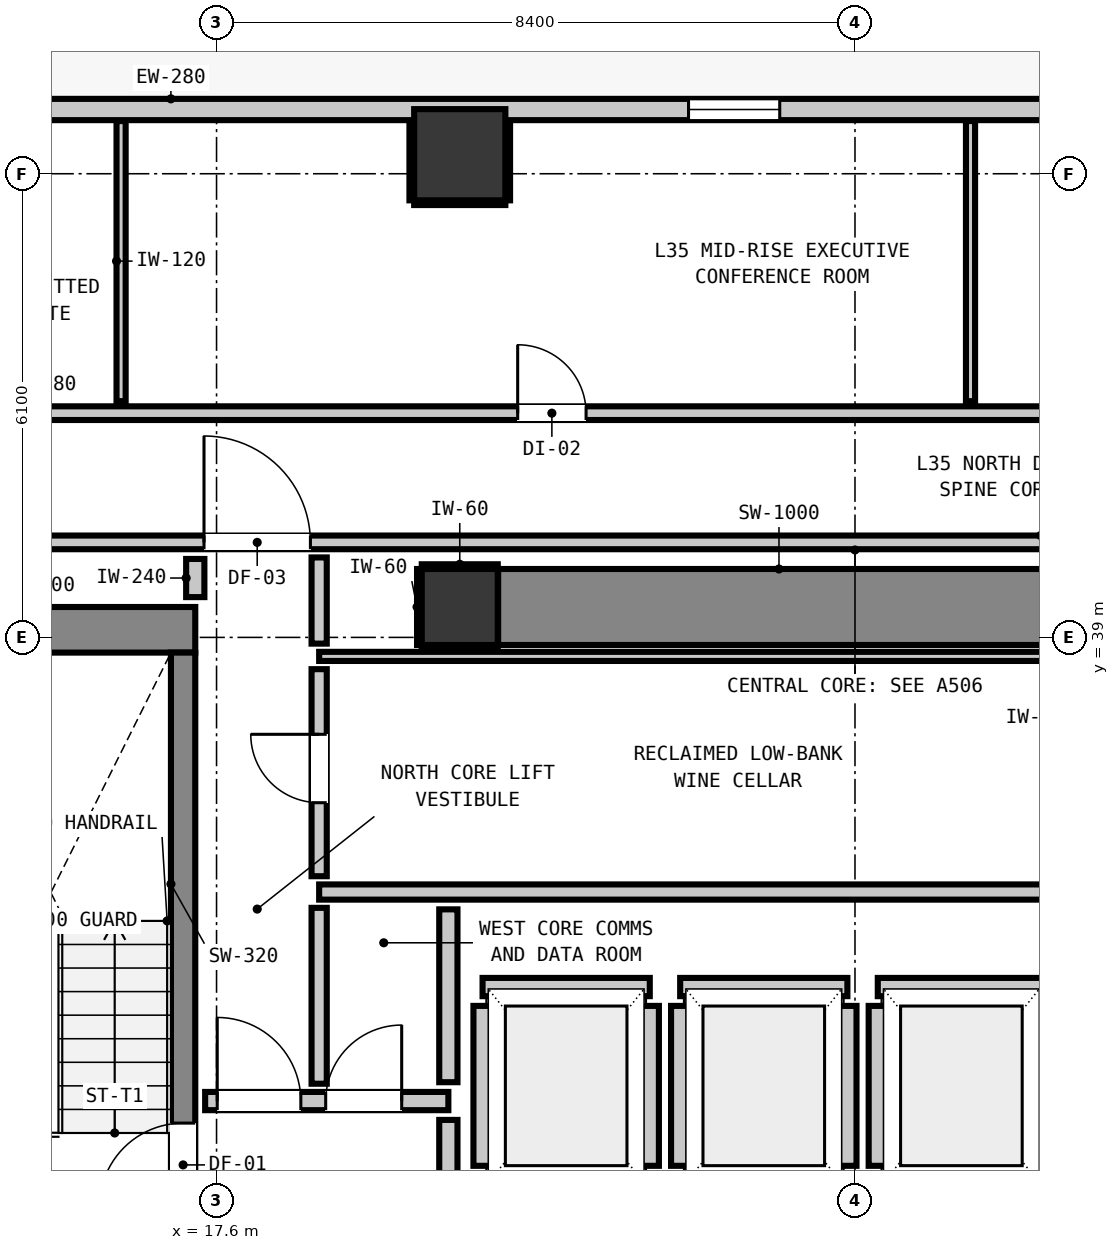
"""IFC4 building model, lengths in metres.
Left out: names, types, materials, properties, quantities, classifications, styles, units other than length and angle.
Written with IfcOpenShell. Run it as: python <this file> out.ifc"""

import sys

from ifc_helpers import new_model, si_unit, direction, frame, frame_2d, origin, origin_2d, place, context, subcontext, project, spatial, rectangle, extrude, element, fill, save


model = new_model("IFC4")
c1 = context("Model", 3, precision=1e-05, world=origin(), true_north=direction((0.0, 1.0)))
c2 = subcontext(c1, "Body", "Model", "MODEL_VIEW")
j1 = project(units=[si_unit("LENGTHUNIT", "METRE"), si_unit("PLANEANGLEUNIT", "RADIAN")], contexts=[c1])
p1 = place(None, origin())
s1 = spatial("IfcSite", under=j1, at=p1, CompositionType="ELEMENT")
p2 = place(p1, origin())
s2 = spatial("IfcBuilding", under=s1, at=p2, CompositionType="ELEMENT")
p3 = place(p2, frame((0.0, 0.0, 122.68)))
s3 = spatial("IfcBuildingStorey", under=s2, at=p3, CompositionType="ELEMENT", Elevation=122.68)
p4 = place(p3, frame((20.8, 39.4, 0.0), z_axis=(0.0, 0.0, 1.0), x_axis=(1.0, 0.0, 0.0)))
e1 = element("IfcColumn", 1, at=p4, inside=s3, PredefinedType="COLUMN", context=c2, shape_type="SweptSolid", body=[
    extrude(rectangle(XDim=1.0, YDim=1.0, at=origin_2d()), origin(), (0.0, 0.0, 1.0), 3.32),
])
p5 = place(p3, frame((13.24, 39.1, 0.0), z_axis=(0.0, 0.0, 1.0), x_axis=(1.0, 0.0, 0.0)))
e2 = element("IfcWall", 2, at=p5, inside=s3, PredefinedType="SHEAR", context=c2, shape_type="SweptSolid", body=[
    extrude(rectangle(XDim=4.08, YDim=0.6, at=frame_2d((2.04, 0.0))), origin(), (0.0, 0.0, 1.0), 3.32),
])
p6 = place(p3, frame((21.305, 39.4, 0.0), z_axis=(0.0, 0.0, 1.0), x_axis=(1.0, 0.0, 0.0)))
e3 = element("IfcWall", 3, at=p6, inside=s3, PredefinedType="SHEAR", context=c2, shape_type="SweptSolid", body=[
    extrude(rectangle(XDim=7.39, YDim=1.0, at=frame_2d((3.695, 0.0))), origin(), (0.0, 0.0, 1.0), 3.32),
])
p7 = place(p3, frame((17.16, 31.0, 0.0), z_axis=(0.0, 0.0, 1.0), x_axis=(0.0, 1.0, 0.0)))
e4 = element("IfcWall", 4, at=p7, inside=s3, PredefinedType="SHEAR", context=c2, shape_type="SweptSolid", body=[
    extrude(rectangle(XDim=7.8, YDim=0.32, at=frame_2d((3.9, 0.0))), origin(), (0.0, 0.0, 1.0), 3.32),
])
p8 = place(p7, frame((0.51, 0.0, 0.0)))
e5 = element("IfcOpeningElement", 5, at=p8, cuts=e4, PredefinedType="OPENING", context=c2, shape_type="SweptSolid", body=[
    extrude(rectangle(XDim=1.1, YDim=2.15, at=frame_2d((0.55, 1.075))), frame((0.0, 0.17, 0.0), z_axis=(0.0, -1.0, 0.0), x_axis=(1.0, 0.0, 0.0)), (0.0, 0.0, 1.0), 0.34),
])
p9 = place(p3, frame((20.8, 45.35, 0.0), z_axis=(0.0, 0.0, 1.0), x_axis=(1.0, 0.0, 0.0)))
e6 = element("IfcColumn", 6, at=p9, inside=s3, PredefinedType="COLUMN", context=c2, shape_type="SweptSolid", body=[
    extrude(rectangle(XDim=1.2, YDim=1.2, at=origin_2d()), origin(), (0.0, 0.0, 1.0), 2.9),
])
p10 = place(p3, frame((5.355, 45.945, 0.0), z_axis=(0.0, 0.0, 1.0), x_axis=(1.0, 0.0, 0.0)))
e7 = element("IfcWall", 7, at=p10, inside=s3, PredefinedType="STANDARD", context=c2, shape_type="SweptSolid", body=[
    extrude(rectangle(XDim=35.09, YDim=0.28, at=frame_2d((17.545, 0.0))), origin(), (0.0, 0.0, 1.0), 2.9),
])
p11 = place(p10, frame((0.904, 0.0, 0.0)))
e8 = element("IfcOpeningElement", 8, at=p11, cuts=e7, PredefinedType="OPENING", context=c2, shape_type="SweptSolid", body=[
    extrude(rectangle(XDim=1.0, YDim=2.15, at=frame_2d((0.5, 1.075))), frame((0.0, 0.15, 0.0), z_axis=(0.0, -1.0, 0.0), x_axis=(1.0, 0.0, 0.0)), (0.0, 0.0, 1.0), 0.3),
])
p12 = place(p10, frame((3.634, 0.0, 0.85)))
e9 = element("IfcOpeningElement", 9, at=p12, cuts=e7, PredefinedType="OPENING", context=c2, shape_type="SweptSolid", body=[
    extrude(rectangle(XDim=1.2, YDim=1.8, at=frame_2d((0.6, 0.9))), frame((0.0, 0.15, 0.0), z_axis=(0.0, -1.0, 0.0), x_axis=(1.0, 0.0, 0.0)), (0.0, 0.0, 1.0), 0.3),
])
p13 = place(p10, frame((18.455, 0.0, 0.85)))
e10 = element("IfcOpeningElement", 10, at=p13, cuts=e7, PredefinedType="OPENING", context=c2, shape_type="SweptSolid", body=[
    extrude(rectangle(XDim=1.2, YDim=1.8, at=frame_2d((0.6, 0.9))), frame((0.0, 0.15, 0.0), z_axis=(0.0, -1.0, 0.0), x_axis=(1.0, 0.0, 0.0)), (0.0, 0.0, 1.0), 0.3),
])
p14 = place(p10, frame((26.895, 0.0, 0.85)))
e11 = element("IfcOpeningElement", 11, at=p14, cuts=e7, PredefinedType="OPENING", context=c2, shape_type="SweptSolid", body=[
    extrude(rectangle(XDim=1.2, YDim=1.8, at=frame_2d((0.6, 0.9))), frame((0.0, 0.15, 0.0), z_axis=(0.0, -1.0, 0.0), x_axis=(1.0, 0.0, 0.0)), (0.0, 0.0, 1.0), 0.3),
])
p15 = place(p3, frame((21.1, 34.4, 0.0), z_axis=(0.0, 0.0, 1.0), x_axis=(1.0, 0.0, 0.0)))
e12 = element("IfcWall", 12, at=p15, inside=s3, PredefinedType="PARTITIONING", context=c2, shape_type="SweptSolid", body=[
    extrude(rectangle(XDim=2.2, YDim=0.24, at=frame_2d((1.1, 0.0))), origin(), (0.0, 0.0, 1.0), 2.9),
])
p16 = place(p3, frame((21.1, 32.048, 0.0), z_axis=(0.0, 0.0, 1.0), x_axis=(0.0, 1.0, 0.0)))
e13 = element("IfcWall", 13, at=p16, inside=s3, PredefinedType="PARTITIONING", context=c2, shape_type="SweptSolid", body=[
    extrude(rectangle(XDim=2.104, YDim=0.24, at=frame_2d((1.052, 0.0))), origin(), (0.0, 0.0, 1.0), 0.905),
])
p17 = place(p3, frame((23.3, 32.048, 0.0), z_axis=(0.0, 0.0, 1.0), x_axis=(0.0, 1.0, 0.0)))
e14 = element("IfcWall", 14, at=p17, inside=s3, PredefinedType="PARTITIONING", context=c2, shape_type="SweptSolid", body=[
    extrude(rectangle(XDim=2.104, YDim=0.24, at=frame_2d((1.052, 0.0))), origin(), (0.0, 0.0, 1.0), 2.9),
])
p18 = place(p3, frame((23.7, 34.4, 0.0), z_axis=(0.0, 0.0, 1.0), x_axis=(1.0, 0.0, 0.0)))
e15 = element("IfcWall", 15, at=p18, inside=s3, PredefinedType="PARTITIONING", context=c2, shape_type="SweptSolid", body=[
    extrude(rectangle(XDim=2.2, YDim=0.24, at=frame_2d((1.1, 0.0))), origin(), (0.0, 0.0, 1.0), 2.9),
])
for number, where, z_axis, x_axis in (
    (16, (23.7, 32.048, 0.0), (0.0, 0.0, 1.0), (0.0, 1.0, 0.0)),
    (17, (25.9, 32.048, 0.0), (0.0, 0.0, 1.0), (0.0, 1.0, 0.0)),
):
    element("IfcWall", number, at=place(p3, frame(where, z_axis=z_axis, x_axis=x_axis)), inside=s3, PredefinedType="PARTITIONING", context=c2, shape_type="SweptSolid", body=[
        extrude(rectangle(XDim=2.104, YDim=0.24, at=frame_2d((1.052, 0.0))), origin(), (0.0, 0.0, 1.0), 2.9),
    ])
p19 = place(p3, frame((26.3, 34.4, 0.0), z_axis=(0.0, 0.0, 1.0), x_axis=(1.0, 0.0, 0.0)))
e18 = element("IfcWall", 18, at=p19, inside=s3, PredefinedType="PARTITIONING", context=c2, shape_type="SweptSolid", body=[
    extrude(rectangle(XDim=2.2, YDim=0.24, at=frame_2d((1.1, 0.0))), origin(), (0.0, 0.0, 1.0), 2.9),
])
p20 = place(p3, frame((26.3, 32.048, 0.0), z_axis=(0.0, 0.0, 1.0), x_axis=(0.0, 1.0, 0.0)))
e19 = element("IfcWall", 19, at=p20, inside=s3, PredefinedType="PARTITIONING", context=c2, shape_type="SweptSolid", body=[
    extrude(rectangle(XDim=2.104, YDim=0.24, at=frame_2d((1.052, 0.0))), origin(), (0.0, 0.0, 1.0), 2.9),
])
p21 = place(p3, frame((28.5, 32.048, 0.0), z_axis=(0.0, 0.0, 1.0), x_axis=(0.0, 1.0, 0.0)))
e20 = element("IfcWall", 20, at=p21, inside=s3, PredefinedType="PARTITIONING", context=c2, shape_type="SweptSolid", body=[
    extrude(rectangle(XDim=2.104, YDim=0.24, at=frame_2d((1.052, 0.0))), origin(), (0.0, 0.0, 1.0), 0.905),
])
p22 = place(p3, frame((17.45, 32.9, 0.0), z_axis=(0.0, 0.0, 1.0), x_axis=(1.0, 0.0, 0.0)))
e21 = element("IfcWall", 21, at=p22, inside=s3, PredefinedType="PARTITIONING", context=c2, shape_type="SweptSolid", body=[
    extrude(rectangle(XDim=3.2, YDim=0.24, at=frame_2d((1.6, 0.0))), origin(), (0.0, 0.0, 1.0), 2.9),
])
p23 = place(p22, frame((0.159, 0.0, 0.0)))
e22 = element("IfcOpeningElement", 22, at=p23, cuts=e21, PredefinedType="OPENING", context=c2, shape_type="SweptSolid", body=[
    extrude(rectangle(XDim=1.1, YDim=2.15, at=frame_2d((0.55, 1.075))), frame((0.0, 0.13, 0.0), z_axis=(0.0, -1.0, 0.0), x_axis=(1.0, 0.0, 0.0)), (0.0, 0.0, 1.0), 0.26),
])
p24 = place(p22, frame((1.586, 0.0, 0.0)))
e23 = element("IfcOpeningElement", 23, at=p24, cuts=e21, PredefinedType="OPENING", context=c2, shape_type="SweptSolid", body=[
    extrude(rectangle(XDim=1.0, YDim=2.15, at=frame_2d((0.5, 1.075))), frame((0.0, 0.13, 0.0), z_axis=(0.0, -1.0, 0.0), x_axis=(1.0, 0.0, 0.0)), (0.0, 0.0, 1.0), 0.26),
])
p25 = place(p3, frame((18.95, 35.65, 0.0), z_axis=(0.0, 0.0, 1.0), x_axis=(1.0, 0.0, 0.0)))
e24 = element("IfcWall", 24, at=p25, inside=s3, PredefinedType="PARTITIONING", context=c2, shape_type="SweptSolid", body=[
    extrude(rectangle(XDim=11.025, YDim=0.2, at=frame_2d((5.513, 0.0))), origin(), (0.0, 0.0, 1.0), 2.9),
])
p26 = place(p3, frame((3.207, 40.25, 0.0), z_axis=(0.0, 0.0, 1.0), x_axis=(1.0, 0.0, 0.0)))
e25 = element("IfcWall", 25, at=p26, inside=s3, PredefinedType="PARTITIONING", context=c2, shape_type="SweptSolid", body=[
    extrude(rectangle(XDim=39.386, YDim=0.18, at=frame_2d((19.693, 0.0))), origin(), (0.0, 0.0, 1.0), 2.9),
])
p27 = place(p26, frame((14.228, 0.0, 0.0)))
e26 = element("IfcOpeningElement", 26, at=p27, cuts=e25, PredefinedType="OPENING", context=c2, shape_type="SweptSolid", body=[
    extrude(rectangle(XDim=1.4, YDim=2.15, at=frame_2d((0.7, 1.075))), frame((0.0, 0.1, 0.0), z_axis=(0.0, -1.0, 0.0), x_axis=(1.0, 0.0, 0.0)), (0.0, 0.0, 1.0), 0.2),
])
p28 = place(p26, frame((7.243, 0.0, 0.0)))
e27 = element("IfcOpeningElement", 27, at=p28, cuts=e25, PredefinedType="OPENING", context=c2, shape_type="SweptSolid", body=[
    extrude(rectangle(XDim=1.4, YDim=2.15, at=frame_2d((0.7, 1.075))), frame((0.0, 0.1, 0.0), z_axis=(0.0, -1.0, 0.0), x_axis=(1.0, 0.0, 0.0)), (0.0, 0.0, 1.0), 0.2),
])
p29 = place(p26, frame((34.843, 0.0, 0.0)))
e28 = element("IfcOpeningElement", 28, at=p29, cuts=e25, PredefinedType="OPENING", context=c2, shape_type="SweptSolid", body=[
    extrude(rectangle(XDim=1.4, YDim=2.15, at=frame_2d((0.7, 1.075))), frame((0.0, 0.1, 0.0), z_axis=(0.0, -1.0, 0.0), x_axis=(1.0, 0.0, 0.0)), (0.0, 0.0, 1.0), 0.2),
])
p30 = place(p26, frame((3.017, 0.0, 0.0)))
e29 = element("IfcOpeningElement", 29, at=p30, cuts=e25, PredefinedType="OPENING", context=c2, shape_type="SweptSolid", body=[
    extrude(rectangle(XDim=0.95, YDim=2.1, at=frame_2d((0.475, 1.05))), frame((0.0, 0.1, 0.0), z_axis=(0.0, -1.0, 0.0), x_axis=(1.0, 0.0, 0.0)), (0.0, 0.0, 1.0), 0.2),
])
p31 = place(p26, frame((37.414, 0.0, 0.0)))
e30 = element("IfcOpeningElement", 30, at=p31, cuts=e25, PredefinedType="OPENING", context=c2, shape_type="SweptSolid", body=[
    extrude(rectangle(XDim=0.9, YDim=2.1, at=frame_2d((0.45, 1.05))), frame((0.0, 0.1, 0.0), z_axis=(0.0, -1.0, 0.0), x_axis=(1.0, 0.0, 0.0)), (0.0, 0.0, 1.0), 0.2),
])
p32 = place(p3, frame((3.207, 41.95, 0.0), z_axis=(0.0, 0.0, 1.0), x_axis=(1.0, 0.0, 0.0)))
e31 = element("IfcWall", 31, at=p32, inside=s3, PredefinedType="PARTITIONING", context=c2, shape_type="SweptSolid", body=[
    extrude(rectangle(XDim=39.386, YDim=0.18, at=frame_2d((19.693, 0.0))), origin(), (0.0, 0.0, 1.0), 2.9),
])
p33 = place(p32, frame((4.828, 0.0, 0.0)))
e32 = element("IfcOpeningElement", 32, at=p33, cuts=e31, PredefinedType="OPENING", context=c2, shape_type="SweptSolid", body=[
    extrude(rectangle(XDim=1.0, YDim=2.15, at=frame_2d((0.5, 1.075))), frame((0.0, 0.1, 0.0), z_axis=(0.0, -1.0, 0.0), x_axis=(1.0, 0.0, 0.0)), (0.0, 0.0, 1.0), 0.2),
])
p34 = place(p32, frame((18.355, 0.0, 0.0)))
e33 = element("IfcOpeningElement", 33, at=p34, cuts=e31, PredefinedType="OPENING", context=c2, shape_type="SweptSolid", body=[
    extrude(rectangle(XDim=0.9, YDim=2.1, at=frame_2d((0.45, 1.05))), frame((0.0, 0.1, 0.0), z_axis=(0.0, -1.0, 0.0), x_axis=(1.0, 0.0, 0.0)), (0.0, 0.0, 1.0), 0.2),
])
p35 = place(p32, frame((31.379, 0.0, 0.0)))
e34 = element("IfcOpeningElement", 34, at=p35, cuts=e31, PredefinedType="OPENING", context=c2, shape_type="SweptSolid", body=[
    extrude(rectangle(XDim=0.9, YDim=2.1, at=frame_2d((0.45, 1.05))), frame((0.0, 0.1, 0.0), z_axis=(0.0, -1.0, 0.0), x_axis=(1.0, 0.0, 0.0)), (0.0, 0.0, 1.0), 0.2),
])
p36 = place(p3, frame((18.95, 38.75, 0.0), z_axis=(0.0, 0.0, 1.0), x_axis=(1.0, 0.0, 0.0)))
e35 = element("IfcWall", 35, at=p36, inside=s3, PredefinedType="PARTITIONING", context=c2, shape_type="SweptSolid", body=[
    extrude(rectangle(XDim=13.56, YDim=0.12, at=frame_2d((6.78, 0.0))), origin(), (0.0, 0.0, 1.0), 0.905),
])
p37 = place(p3, frame((17.32, 39.53, 0.0), z_axis=(0.0, 0.0, 1.0), x_axis=(0.0, 1.0, 0.0)))
e36 = element("IfcWall", 36, at=p37, inside=s3, PredefinedType="PARTITIONING", context=c2, shape_type="SweptSolid", body=[
    extrude(rectangle(XDim=0.502, YDim=0.24, at=frame_2d((0.251, 0.0))), origin(), (0.0, 0.0, 1.0), 2.9),
])
p38 = place(p3, frame((20.65, 31.868, 0.0), z_axis=(0.0, 0.0, 1.0), x_axis=(0.0, 1.0, 0.0)))
e37 = element("IfcWall", 37, at=p38, inside=s3, PredefinedType="PARTITIONING", context=c2, shape_type="SweptSolid", body=[
    extrude(rectangle(XDim=0.784, YDim=0.24, at=frame_2d((0.392, 0.0))), origin(), (0.0, 0.0, 1.0), 0.905),
])
p39 = place(p3, frame((20.65, 33.148, 0.0), z_axis=(0.0, 0.0, 1.0), x_axis=(0.0, 1.0, 0.0)))
e38 = element("IfcWall", 38, at=p39, inside=s3, PredefinedType="PARTITIONING", context=c2, shape_type="SweptSolid", body=[
    extrude(rectangle(XDim=2.274, YDim=0.24, at=frame_2d((1.137, 0.0))), origin(), (0.0, 0.0, 1.0), 0.905),
])
p40 = place(p3, frame((18.95, 33.128, 0.0), z_axis=(0.0, 0.0, 1.0), x_axis=(0.0, 1.0, 0.0)))
e39 = element("IfcWall", 39, at=p40, inside=s3, PredefinedType="PARTITIONING", context=c2, shape_type="SweptSolid", body=[
    extrude(rectangle(XDim=2.314, YDim=0.2, at=frame_2d((1.157, 0.0))), origin(), (0.0, 0.0, 1.0), 2.9),
])
p41 = place(p3, frame((18.95, 35.858, 0.0), z_axis=(0.0, 0.0, 1.0), x_axis=(0.0, 1.0, 0.0)))
e40 = element("IfcWall", 40, at=p41, inside=s3, PredefinedType="PARTITIONING", context=c2, shape_type="SweptSolid", body=[
    extrude(rectangle(XDim=2.724, YDim=0.2, at=frame_2d((1.362, 0.0))), origin(), (0.0, 0.0, 1.0), 2.9),
])
p42 = place(p41, frame((0.967, 0.0, 0.0)))
e41 = element("IfcOpeningElement", 41, at=p42, cuts=e40, PredefinedType="OPENING", context=c2, shape_type="SweptSolid", body=[
    extrude(rectangle(XDim=0.9, YDim=2.1, at=frame_2d((0.45, 1.05))), frame((0.0, 0.11, 0.0), z_axis=(0.0, -1.0, 0.0), x_axis=(1.0, 0.0, 0.0)), (0.0, 0.0, 1.0), 0.22),
])
p43 = place(p3, frame((18.95, 38.918, 0.0), z_axis=(0.0, 0.0, 1.0), x_axis=(0.0, 1.0, 0.0)))
e42 = element("IfcWall", 42, at=p43, inside=s3, PredefinedType="PARTITIONING", context=c2, shape_type="SweptSolid", body=[
    extrude(rectangle(XDim=1.134, YDim=0.2, at=frame_2d((0.567, 0.0))), origin(), (0.0, 0.0, 1.0), 2.9),
])
for number, where, z_axis, x_axis in (
    (43, (16.344, 42.108, 0.0), (0.0, 0.0, 1.0), (0.0, 1.0, 0.0)),
    (44, (27.52, 42.108, 0.0), (0.0, 0.0, 1.0), (0.0, 1.0, 0.0)),
):
    element("IfcWall", number, at=place(p3, frame(where, z_axis=z_axis, x_axis=x_axis)), inside=s3, PredefinedType="PARTITIONING", context=c2, shape_type="SweptSolid", body=[
        extrude(rectangle(XDim=3.685, YDim=0.12, at=frame_2d((1.843, 0.0))), origin(), (0.0, 0.0, 1.0), 2.9),
    ])
for number, where, z_axis, x_axis in (
    (45, (20.3, 38.868, 0.0), (0.0, 0.0, 1.0), (1.0, 0.0, 0.0)),
    (46, (20.3, 39.932, 0.0), (0.0, 0.0, 1.0), (1.0, 0.0, 0.0)),
    (47, (20.268, 38.9, 0.0), (0.0, 0.0, 1.0), (0.0, 1.0, 0.0)),
):
    element("IfcWall", number, at=place(p3, frame(where, z_axis=z_axis, x_axis=x_axis)), inside=s3, PredefinedType="PARTITIONING", context=c2, shape_type="SweptSolid", body=[
        extrude(rectangle(XDim=1.0, YDim=0.06, at=frame_2d((0.5, 0.0))), origin(), (0.0, 0.0, 1.0), 0.905),
    ])
p44 = place(p3, frame((20.2, 44.718, 0.0), z_axis=(0.0, 0.0, 1.0), x_axis=(1.0, 0.0, 0.0)))
e48 = element("IfcWall", 48, at=p44, inside=s3, PredefinedType="PARTITIONING", context=c2, shape_type="SweptSolid", body=[
    extrude(rectangle(XDim=1.2, YDim=0.06, at=frame_2d((0.6, 0.0))), origin(), (0.0, 0.0, 1.0), 1.45),
])
for number, where, z_axis, x_axis in (
    (49, (20.168, 44.75, 0.0), (0.0, 0.0, 1.0), (0.0, 1.0, 0.0)),
    (50, (21.432, 44.75, 0.0), (0.0, 0.0, 1.0), (0.0, 1.0, 0.0)),
):
    element("IfcWall", number, at=place(p3, frame(where, z_axis=z_axis, x_axis=x_axis)), inside=s3, PredefinedType="PARTITIONING", context=c2, shape_type="SweptSolid", body=[
        extrude(rectangle(XDim=1.04, YDim=0.06, at=frame_2d((0.52, 0.0))), origin(), (0.0, 0.0, 1.0), 0.905),
    ])
p45 = place(p13, origin())
e51 = element("IfcWindow", 51, at=p45, inside=s3, PartitioningType="SINGLE_PANEL", PredefinedType="WINDOW", context=c2, shape_type="SweptSolid", body=[
    extrude(rectangle(XDim=1.2, YDim=1.8, at=frame_2d((0.6, 0.9))), frame((0.0, 0.03, 0.0), z_axis=(0.0, -1.0, 0.0), x_axis=(1.0, 0.0, 0.0)), (0.0, 0.0, 1.0), 0.06),
])
fill(e10, e51)
p46 = place(p8, origin())
e52 = element("IfcDoor", 52, at=p46, inside=s3, OperationType="SINGLE_SWING_LEFT", PredefinedType="DOOR", context=c2, shape_type="SweptSolid", body=[
    extrude(rectangle(XDim=1.1, YDim=2.15, at=frame_2d((0.55, 1.075))), frame((0.0, 0.025, 0.0), z_axis=(0.0, -1.0, 0.0), x_axis=(1.0, 0.0, 0.0)), (0.0, 0.0, 1.0), 0.05),
])
fill(e5, e52)
p47 = place(p23, origin())
e53 = element("IfcDoor", 53, at=p47, inside=s3, OperationType="SINGLE_SWING_LEFT", PredefinedType="DOOR", context=c2, shape_type="SweptSolid", body=[
    extrude(rectangle(XDim=1.1, YDim=2.15, at=frame_2d((0.55, 1.075))), frame((0.0, 0.025, 0.0), z_axis=(0.0, -1.0, 0.0), x_axis=(1.0, 0.0, 0.0)), (0.0, 0.0, 1.0), 0.05),
])
fill(e22, e53)
p48 = place(p27, origin())
e54 = element("IfcDoor", 54, at=p48, inside=s3, OperationType="SINGLE_SWING_LEFT", PredefinedType="DOOR", context=c2, shape_type="SweptSolid", body=[
    extrude(rectangle(XDim=1.4, YDim=2.15, at=frame_2d((0.7, 1.075))), frame((0.0, 0.025, 0.0), z_axis=(0.0, -1.0, 0.0), x_axis=(1.0, 0.0, 0.0)), (0.0, 0.0, 1.0), 0.05),
])
fill(e26, e54)
p49 = place(p24, origin())
e55 = element("IfcDoor", 55, at=p49, inside=s3, OperationType="SINGLE_SWING_RIGHT", PredefinedType="DOOR", context=c2, shape_type="SweptSolid", body=[
    extrude(rectangle(XDim=1.0, YDim=2.15, at=frame_2d((0.5, 1.075))), frame((0.0, 0.025, 0.0), z_axis=(0.0, -1.0, 0.0), x_axis=(1.0, 0.0, 0.0)), (0.0, 0.0, 1.0), 0.05),
])
fill(e23, e55)
p50 = place(p42, origin())
e56 = element("IfcDoor", 56, at=p50, inside=s3, OperationType="SINGLE_SWING_RIGHT", PredefinedType="DOOR", context=c2, shape_type="SweptSolid", body=[
    extrude(rectangle(XDim=0.9, YDim=2.1, at=frame_2d((0.45, 1.05))), frame((0.0, 0.025, 0.0), z_axis=(0.0, -1.0, 0.0), x_axis=(1.0, 0.0, 0.0)), (0.0, 0.0, 1.0), 0.05),
])
fill(e41, e56)
p51 = place(p34, origin())
e57 = element("IfcDoor", 57, at=p51, inside=s3, OperationType="SINGLE_SWING_LEFT", PredefinedType="DOOR", context=c2, shape_type="SweptSolid", body=[
    extrude(rectangle(XDim=0.9, YDim=2.1, at=frame_2d((0.45, 1.05))), frame((0.0, 0.025, 0.0), z_axis=(0.0, -1.0, 0.0), x_axis=(1.0, 0.0, 0.0)), (0.0, 0.0, 1.0), 0.05),
])
fill(e33, e57)
save(model, sys.argv[1])
